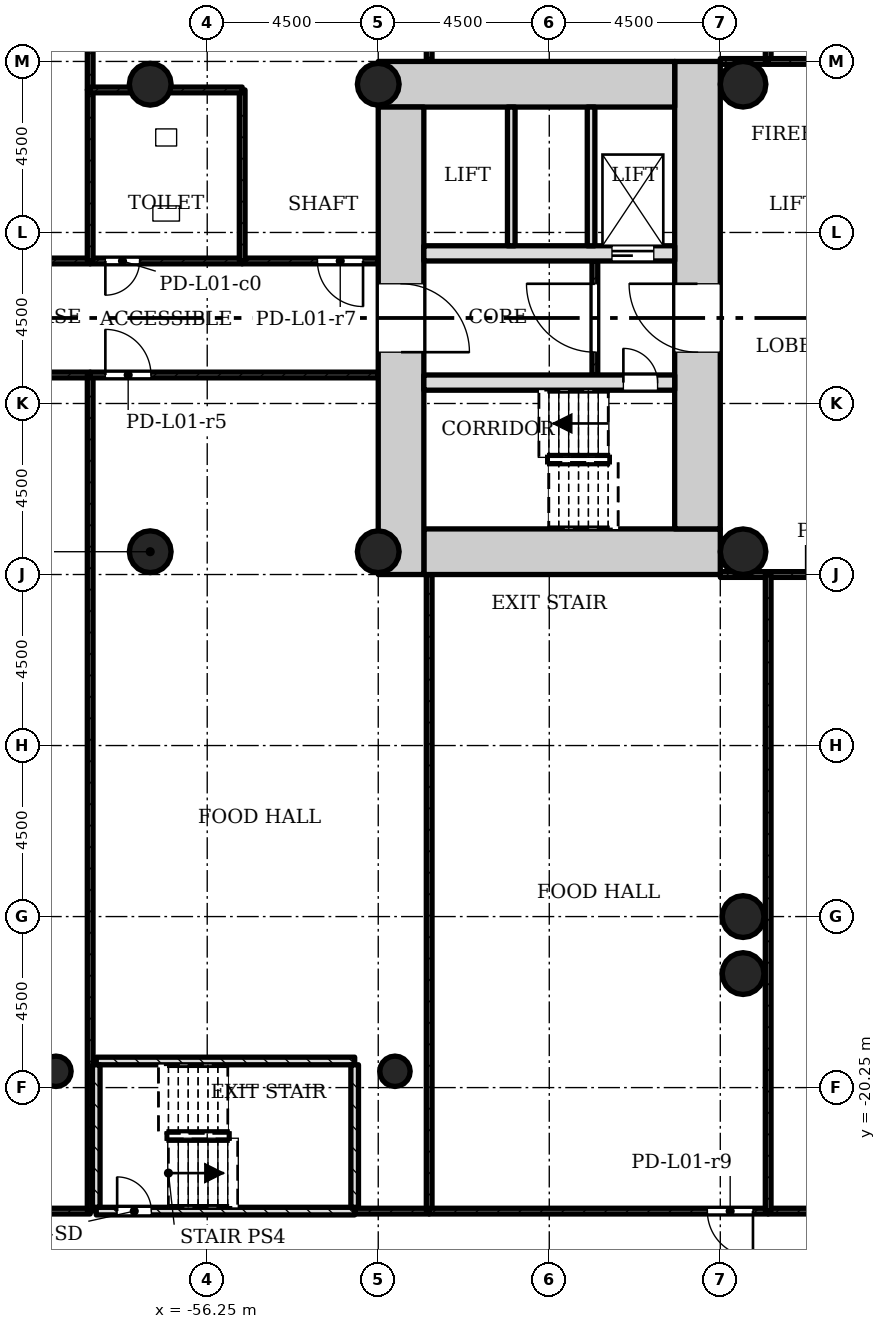
"""IFC4 building model, lengths in metres.
Left out: names, types, materials, properties, quantities, classifications, styles, units other than length and angle.
Written with IfcOpenShell. Run it as: python <this file> out.ifc"""

import sys

from ifc_helpers import new_model, si_unit, direction, frame, frame_2d, origin, origin_2d, place, context, subcontext, project, spatial, rectangle, hollow_circle, extrude, element, fill, save


model = new_model("IFC4")
c1 = context("Model", 3, precision=1e-05, world=origin(), true_north=direction((0.0, 1.0)))
c2 = subcontext(c1, "Body", "Model", "MODEL_VIEW")
j1 = project(units=[si_unit("LENGTHUNIT", "METRE"), si_unit("PLANEANGLEUNIT", "RADIAN")], contexts=[c1])
p1 = place(None, origin())
s1 = spatial("IfcSite", under=j1, at=p1, CompositionType="ELEMENT")
p2 = place(p1, origin())
s2 = spatial("IfcBuilding", under=s1, at=p2, CompositionType="ELEMENT")
p3 = place(p2, frame((0.0, 0.0, 6.0)))
s3 = spatial("IfcBuildingStorey", under=s2, at=p3, CompositionType="ELEMENT", Elevation=6.0)
p4 = place(p3, frame((-50.55, -6.15, 0.0), z_axis=(0.0, 0.0, 1.0), x_axis=(1.0, 0.0, 0.0)))
e1 = element("IfcWall", 1, at=p4, inside=s3, PredefinedType="SHEAR", context=c2, shape_type="SweptSolid", body=[
    extrude(rectangle(XDim=7.8, YDim=1.2, at=frame_2d((3.9, 0.0))), origin(), (0.0, 0.0, 1.0), 5.0),
])
p5 = place(p3, frame((-43.35, -5.55, 0.0), z_axis=(0.0, 0.0, 1.0), x_axis=(0.0, 1.0, 0.0)))
e2 = element("IfcWall", 2, at=p5, inside=s3, PredefinedType="SHEAR", context=c2, shape_type="SweptSolid", body=[
    extrude(rectangle(XDim=12.3, YDim=1.2, at=frame_2d((6.15, 0.0))), origin(), (0.0, 0.0, 1.0), 5.0),
])
p6 = place(p5, frame((4.65, 0.0, 0.0)))
e3 = element("IfcOpeningElement", 3, at=p6, cuts=e2, PredefinedType="OPENING", context=c2, shape_type="SweptSolid", body=[
    extrude(rectangle(XDim=1.8, YDim=2.1, at=frame_2d((0.9, 1.05))), frame((0.0, 0.61, 0.0), z_axis=(0.0, -1.0, 0.0), x_axis=(1.0, 0.0, 0.0)), (0.0, 0.0, 1.0), 1.22),
])
p7 = place(p3, frame((-43.95, 6.15, 0.0), z_axis=(0.0, 0.0, 1.0), x_axis=(-1.0, 0.0, 0.0)))
e4 = element("IfcWall", 4, at=p7, inside=s3, PredefinedType="SHEAR", context=c2, shape_type="SweptSolid", body=[
    extrude(rectangle(XDim=7.8, YDim=1.2, at=frame_2d((3.9, 0.0))), origin(), (0.0, 0.0, 1.0), 5.0),
])
p8 = place(p3, frame((-51.15, 5.55, 0.0), z_axis=(0.0, 0.0, 1.0), x_axis=(0.0, -1.0, 0.0)))
e5 = element("IfcWall", 5, at=p8, inside=s3, PredefinedType="SHEAR", context=c2, shape_type="SweptSolid", body=[
    extrude(rectangle(XDim=12.3, YDim=1.2, at=frame_2d((6.15, 0.0))), origin(), (0.0, 0.0, 1.0), 5.0),
])
p9 = place(p8, frame((4.65, 0.0, 0.0)))
e6 = element("IfcOpeningElement", 6, at=p9, cuts=e5, PredefinedType="OPENING", context=c2, shape_type="SweptSolid", body=[
    extrude(rectangle(XDim=1.8, YDim=2.1, at=frame_2d((0.9, 1.05))), frame((0.0, 0.61, 0.0), z_axis=(0.0, -1.0, 0.0), x_axis=(1.0, 0.0, 0.0)), (0.0, 0.0, 1.0), 1.22),
])
p10 = place(p3, frame((-50.55, -1.7, 0.0), z_axis=(0.0, 0.0, 1.0), x_axis=(1.0, 0.0, 0.0)))
e7 = element("IfcWall", 7, at=p10, inside=s3, PredefinedType="SHEAR", context=c2, shape_type="SweptSolid", body=[
    extrude(rectangle(XDim=6.6, YDim=0.4, at=frame_2d((3.3, 0.0))), origin(), (0.0, 0.0, 1.0), 5.0),
])
p11 = place(p10, frame((5.25, 0.0, 0.0)))
e8 = element("IfcOpeningElement", 8, at=p11, cuts=e7, PredefinedType="OPENING", context=c2, shape_type="SweptSolid", body=[
    extrude(rectangle(XDim=0.9, YDim=2.1, at=frame_2d((0.45, 1.05))), frame((0.0, 0.21, 0.0), z_axis=(0.0, -1.0, 0.0), x_axis=(1.0, 0.0, 0.0)), (0.0, 0.0, 1.0), 0.42),
])
p12 = place(p3, frame((-50.55, 1.7, 0.0), z_axis=(0.0, 0.0, 1.0), x_axis=(1.0, 0.0, 0.0)))
e9 = element("IfcWall", 9, at=p12, inside=s3, PredefinedType="SHEAR", context=c2, shape_type="SweptSolid", body=[
    extrude(rectangle(XDim=6.6, YDim=0.4, at=frame_2d((3.3, 0.0))), origin(), (0.0, 0.0, 1.0), 5.0),
])
p13 = place(p12, frame((4.95, 0.0, 0.0)))
e10 = element("IfcOpeningElement", 10, at=p13, cuts=e9, PredefinedType="OPENING", context=c2, shape_type="SweptSolid", body=[
    extrude(rectangle(XDim=1.1, YDim=2.1, at=frame_2d((0.55, 1.05))), frame((0.0, 0.21, 0.0), z_axis=(0.0, -1.0, 0.0), x_axis=(1.0, 0.0, 0.0)), (0.0, 0.0, 1.0), 0.42),
])
for number, where, z_axis, x_axis in (
    (11, (-51.75, -6.15, 0.0), (0.0, 0.0, 1.0), (1.0, 0.0, 0.0)),
    (12, (-51.75, 6.15, 0.0), (0.0, 0.0, 1.0), (1.0, 0.0, 0.0)),
    (13, (-57.75, -6.15, 0.0), (0.0, 0.0, 1.0), (1.0, 0.0, 0.0)),
    (14, (-57.75, 6.15, 0.0), (0.0, 0.0, 1.0), (1.0, 0.0, 0.0)),
    (15, (-42.15, -15.75, 0.0), (0.0, 0.0, 1.0), (1.0, 0.0, 0.0)),
    (16, (-42.15, -17.25, 0.0), (0.0, 0.0, 1.0), (1.0, 0.0, 0.0)),
):
    element("IfcColumn", number, at=place(p3, frame(where, z_axis=z_axis, x_axis=x_axis)), inside=s3, PredefinedType="COLUMN", context=c2, shape_type="SweptSolid", body=[
        extrude(hollow_circle(Radius=0.55, WallThickness=0.04, at=origin_2d()), origin(), (0.0, 0.0, 1.0), 5.0),
    ])
for number, where, z_axis, x_axis in (
    (17, (-42.15, -6.15, 0.0), (0.0, 0.0, 1.0), (1.0, 0.0, 0.0)),
    (18, (-42.15, 6.15, 0.0), (0.0, 0.0, 1.0), (1.0, 0.0, 0.0)),
):
    element("IfcColumn", number, at=place(p3, frame(where, z_axis=z_axis, x_axis=x_axis)), inside=s3, PredefinedType="COLUMN", context=c2, shape_type="SweptSolid", body=[
        extrude(hollow_circle(Radius=0.6, WallThickness=0.045, at=origin_2d()), origin(), (0.0, 0.0, 1.0), 5.0),
    ])
for number, where, z_axis, x_axis in (
    (19, (-60.23, -19.821, 0.0), (0.0, 0.0, 1.0), (1.0, 0.0, 0.0)),
    (20, (-51.31, -19.821, 0.0), (0.0, 0.0, 1.0), (1.0, 0.0, 0.0)),
):
    element("IfcColumn", number, at=place(p3, frame(where, z_axis=z_axis, x_axis=x_axis)), inside=s3, PredefinedType="COLUMN", context=c2, shape_type="SweptSolid", body=[
        extrude(hollow_circle(Radius=0.4, WallThickness=0.028, at=origin_2d()), origin(), (0.0, 0.0, 1.0), 5.0),
    ])
p14 = place(p3, frame((-46.05, 1.5, 0.0), z_axis=(0.0, 0.0, 1.0), x_axis=(0.0, -1.0, 0.0)))
e21 = element("IfcWall", 21, at=p14, inside=s3, PredefinedType="PARTITIONING", context=c2, shape_type="SweptSolid", body=[
    extrude(rectangle(XDim=3.0, YDim=0.15, at=frame_2d((1.5, 0.0))), origin(), (0.0, 0.0, 1.0), 4.58),
])
p15 = place(p14, frame((0.6, 0.0, 0.0)))
e22 = element("IfcOpeningElement", 22, at=p15, cuts=e21, PredefinedType="OPENING", context=c2, shape_type="SweptSolid", body=[
    extrude(rectangle(XDim=1.8, YDim=2.1, at=frame_2d((0.9, 1.05))), frame((0.0, 0.085, 0.0), z_axis=(0.0, -1.0, 0.0), x_axis=(1.0, 0.0, 0.0)), (0.0, 0.0, 1.0), 0.17),
])
for number, where, z_axis, x_axis in (
    (23, (-46.15, 5.55, 0.0), (0.0, 0.0, 1.0), (0.0, -1.0, 0.0)),
    (24, (-48.25, 5.55, 0.0), (0.0, 0.0, 1.0), (0.0, -1.0, 0.0)),
):
    element("IfcWall", number, at=place(p3, frame(where, z_axis=z_axis, x_axis=x_axis)), inside=s3, PredefinedType="SOLIDWALL", context=c2, shape_type="SweptSolid", body=[
        extrude(rectangle(XDim=3.65, YDim=0.2, at=frame_2d((1.825, 0.0))), origin(), (0.0, 0.0, 1.0), 4.58),
    ])
p16 = place(p3, frame((-69.85, -1.5, 0.0), z_axis=(0.0, 0.0, 1.0), x_axis=(1.0, 0.0, 0.0)))
e25 = element("IfcWall", 25, at=p16, inside=s3, PredefinedType="PARTITIONING", context=c2, shape_type="SweptSolid", body=[
    extrude(rectangle(XDim=10.52, YDim=0.15, at=frame_2d((5.26, 0.0))), origin(), (0.0, 0.0, 1.0), 4.58),
])
p17 = place(p16, frame((2.4, 0.0, 0.0)))
e26 = element("IfcOpeningElement", 26, at=p17, cuts=e25, PredefinedType="OPENING", context=c2, shape_type="SweptSolid", body=[
    extrude(rectangle(XDim=1.2, YDim=2.1, at=frame_2d((0.6, 1.05))), frame((0.0, 0.085, 0.0), z_axis=(0.0, -1.0, 0.0), x_axis=(1.0, 0.0, 0.0)), (0.0, 0.0, 1.0), 0.17),
])
p18 = place(p3, frame((-59.33, -23.5, 0.0), z_axis=(0.0, 0.0, 1.0), x_axis=(-1.0, 0.0, 0.0)))
e27 = element("IfcWall", 27, at=p18, inside=s3, PredefinedType="PARTITIONING", context=c2, shape_type="SweptSolid", body=[
    extrude(rectangle(XDim=10.52, YDim=0.15, at=frame_2d((5.26, 0.0))), origin(), (0.0, 0.0, 1.0), 4.58),
])
p19 = place(p3, frame((-59.33, -1.5, 0.0), z_axis=(0.0, 0.0, 1.0), x_axis=(0.0, -1.0, 0.0)))
e28 = element("IfcWall", 28, at=p19, inside=s3, PredefinedType="PARTITIONING", context=c2, shape_type="SweptSolid", body=[
    extrude(rectangle(XDim=22.0, YDim=0.15, at=frame_2d((11.0, 0.0))), origin(), (0.0, 0.0, 1.0), 4.58),
])
p20 = place(p3, frame((-59.33, 1.5, 0.0), z_axis=(0.0, 0.0, 1.0), x_axis=(-1.0, 0.0, 0.0)))
e29 = element("IfcWall", 29, at=p20, inside=s3, PredefinedType="PARTITIONING", context=c2, shape_type="SweptSolid", body=[
    extrude(rectangle(XDim=1.96, YDim=0.15, at=frame_2d((0.98, 0.0))), origin(), (0.0, 0.0, 1.0), 4.58),
])
p21 = place(p3, frame((-59.33, 26.5, 0.0), z_axis=(0.0, 0.0, 1.0), x_axis=(0.0, -1.0, 0.0)))
e30 = element("IfcWall", 30, at=p21, inside=s3, PredefinedType="PARTITIONING", context=c2, shape_type="SweptSolid", body=[
    extrude(rectangle(XDim=20.5, YDim=0.15, at=frame_2d((10.25, 0.0))), origin(), (0.0, 0.0, 1.0), 4.58),
])
p22 = place(p3, frame((-59.33, -1.5, 0.0), z_axis=(0.0, 0.0, 1.0), x_axis=(1.0, 0.0, 0.0)))
e31 = element("IfcWall", 31, at=p22, inside=s3, PredefinedType="PARTITIONING", context=c2, shape_type="SweptSolid", body=[
    extrude(rectangle(XDim=7.58, YDim=0.15, at=frame_2d((3.79, 0.0))), origin(), (0.0, 0.0, 1.0), 4.58),
])
p23 = place(p22, frame((0.4, 0.0, 0.0)))
e32 = element("IfcOpeningElement", 32, at=p23, cuts=e31, PredefinedType="OPENING", context=c2, shape_type="SweptSolid", body=[
    extrude(rectangle(XDim=1.2, YDim=2.1, at=frame_2d((0.6, 1.05))), frame((0.0, 0.085, 0.0), z_axis=(0.0, -1.0, 0.0), x_axis=(1.0, 0.0, 0.0)), (0.0, 0.0, 1.0), 0.17),
])
p24 = place(p3, frame((-50.41, -23.5, 0.0), z_axis=(0.0, 0.0, 1.0), x_axis=(-1.0, 0.0, 0.0)))
e33 = element("IfcWall", 33, at=p24, inside=s3, PredefinedType="PARTITIONING", context=c2, shape_type="SweptSolid", body=[
    extrude(rectangle(XDim=1.96, YDim=0.15, at=frame_2d((0.98, 0.0))), origin(), (0.0, 0.0, 1.0), 4.58),
])
p25 = place(p3, frame((-50.41, -6.75, 0.0), z_axis=(0.0, 0.0, 1.0), x_axis=(0.0, -1.0, 0.0)))
e34 = element("IfcWall", 34, at=p25, inside=s3, PredefinedType="PARTITIONING", context=c2, shape_type="SweptSolid", body=[
    extrude(rectangle(XDim=16.75, YDim=0.15, at=frame_2d((8.375, 0.0))), origin(), (0.0, 0.0, 1.0), 4.58),
])
p26 = place(p3, frame((-51.75, 1.5, 0.0), z_axis=(0.0, 0.0, 1.0), x_axis=(-1.0, 0.0, 0.0)))
e35 = element("IfcWall", 35, at=p26, inside=s3, PredefinedType="PARTITIONING", context=c2, shape_type="SweptSolid", body=[
    extrude(rectangle(XDim=3.58, YDim=0.15, at=frame_2d((1.79, 0.0))), origin(), (0.0, 0.0, 1.0), 4.58),
])
p27 = place(p26, frame((0.4, 0.0, 0.0)))
e36 = element("IfcOpeningElement", 36, at=p27, cuts=e35, PredefinedType="OPENING", context=c2, shape_type="SweptSolid", body=[
    extrude(rectangle(XDim=1.2, YDim=2.1, at=frame_2d((0.6, 1.05))), frame((0.0, 0.085, 0.0), z_axis=(0.0, -1.0, 0.0), x_axis=(1.0, 0.0, 0.0)), (0.0, 0.0, 1.0), 0.17),
])
p28 = place(p3, frame((-42.75, -6.75, 0.0), z_axis=(0.0, 0.0, 1.0), x_axis=(1.0, 0.0, 0.0)))
e37 = element("IfcWall", 37, at=p28, inside=s3, PredefinedType="PARTITIONING", context=c2, shape_type="SweptSolid", body=[
    extrude(rectangle(XDim=1.26, YDim=0.15, at=frame_2d((0.63, 0.0))), origin(), (0.0, 0.0, 1.0), 4.58),
])
p29 = place(p3, frame((-41.49, -23.5, 0.0), z_axis=(0.0, 0.0, 1.0), x_axis=(-1.0, 0.0, 0.0)))
e38 = element("IfcWall", 38, at=p29, inside=s3, PredefinedType="PARTITIONING", context=c2, shape_type="SweptSolid", body=[
    extrude(rectangle(XDim=8.92, YDim=0.15, at=frame_2d((4.46, 0.0))), origin(), (0.0, 0.0, 1.0), 4.58),
])
p30 = place(p29, frame((0.4, 0.0, 0.0)))
e39 = element("IfcOpeningElement", 39, at=p30, cuts=e38, PredefinedType="OPENING", context=c2, shape_type="SweptSolid", body=[
    extrude(rectangle(XDim=1.2, YDim=2.1, at=frame_2d((0.6, 1.05))), frame((0.0, 0.085, 0.0), z_axis=(0.0, -1.0, 0.0), x_axis=(1.0, 0.0, 0.0)), (0.0, 0.0, 1.0), 0.17),
])
p31 = place(p3, frame((-41.49, 6.75, 0.0), z_axis=(0.0, 0.0, 1.0), x_axis=(-1.0, 0.0, 0.0)))
e40 = element("IfcWall", 40, at=p31, inside=s3, PredefinedType="PARTITIONING", context=c2, shape_type="SweptSolid", body=[
    extrude(rectangle(XDim=1.26, YDim=0.15, at=frame_2d((0.63, 0.0))), origin(), (0.0, 0.0, 1.0), 4.58),
])
for number, where, z_axis, x_axis in (
    (41, (-50.41, 6.75, 0.0), (0.0, 0.0, 1.0), (0.0, 1.0, 0.0)),
    (42, (-41.49, 26.5, 0.0), (0.0, 0.0, 1.0), (0.0, -1.0, 0.0)),
):
    element("IfcWall", number, at=place(p3, frame(where, z_axis=z_axis, x_axis=x_axis)), inside=s3, PredefinedType="PARTITIONING", context=c2, shape_type="SweptSolid", body=[
        extrude(rectangle(XDim=19.75, YDim=0.15, at=frame_2d((9.875, 0.0))), origin(), (0.0, 0.0, 1.0), 4.58),
    ])
p32 = place(p3, frame((-41.49, -6.75, 0.0), z_axis=(0.0, 0.0, 1.0), x_axis=(1.0, 0.0, 0.0)))
e43 = element("IfcWall", 43, at=p32, inside=s3, PredefinedType="PARTITIONING", context=c2, shape_type="SweptSolid", body=[
    extrude(rectangle(XDim=8.92, YDim=0.15, at=frame_2d((4.46, 0.0))), origin(), (0.0, 0.0, 1.0), 4.58),
])
p33 = place(p32, frame((1.0, 0.0, 0.0)))
e44 = element("IfcOpeningElement", 44, at=p33, cuts=e43, PredefinedType="OPENING", context=c2, shape_type="SweptSolid", body=[
    extrude(rectangle(XDim=1.2, YDim=2.1, at=frame_2d((0.6, 1.05))), frame((0.0, 0.085, 0.0), z_axis=(0.0, -1.0, 0.0), x_axis=(1.0, 0.0, 0.0)), (0.0, 0.0, 1.0), 0.17),
])
p34 = place(p3, frame((-32.57, -23.5, 0.0), z_axis=(0.0, 0.0, 1.0), x_axis=(-1.0, 0.0, 0.0)))
e45 = element("IfcWall", 45, at=p34, inside=s3, PredefinedType="PARTITIONING", context=c2, shape_type="SweptSolid", body=[
    extrude(rectangle(XDim=8.92, YDim=0.15, at=frame_2d((4.46, 0.0))), origin(), (0.0, 0.0, 1.0), 4.58),
])
p35 = place(p3, frame((-41.49, -23.5, 0.0), z_axis=(0.0, 0.0, 1.0), x_axis=(0.0, 1.0, 0.0)))
e46 = element("IfcWall", 46, at=p35, inside=s3, PredefinedType="PARTITIONING", context=c2, shape_type="SweptSolid", body=[
    extrude(rectangle(XDim=16.75, YDim=0.15, at=frame_2d((8.375, 0.0))), origin(), (0.0, 0.0, 1.0), 4.58),
])
p36 = place(p3, frame((-32.57, 6.75, 0.0), z_axis=(0.0, 0.0, 1.0), x_axis=(-1.0, 0.0, 0.0)))
e47 = element("IfcWall", 47, at=p36, inside=s3, PredefinedType="PARTITIONING", context=c2, shape_type="SweptSolid", body=[
    extrude(rectangle(XDim=8.92, YDim=0.15, at=frame_2d((4.46, 0.0))), origin(), (0.0, 0.0, 1.0), 4.58),
])
p37 = place(p3, frame((-59.33, 1.5, 0.0), z_axis=(0.0, 0.0, 1.0), x_axis=(1.0, 0.0, 0.0)))
e48 = element("IfcWall", 48, at=p37, inside=s3, PredefinedType="PARTITIONING", context=c2, shape_type="SweptSolid", body=[
    extrude(rectangle(XDim=4.0, YDim=0.15, at=frame_2d((2.0, 0.0))), origin(), (0.0, 0.0, 1.0), 4.58),
])
p38 = place(p37, frame((0.4, 0.0, 0.0)))
e49 = element("IfcOpeningElement", 49, at=p38, cuts=e48, PredefinedType="OPENING", context=c2, shape_type="SweptSolid", body=[
    extrude(rectangle(XDim=0.9, YDim=2.1, at=frame_2d((0.45, 1.05))), frame((0.0, 0.085, 0.0), z_axis=(0.0, -1.0, 0.0), x_axis=(1.0, 0.0, 0.0)), (0.0, 0.0, 1.0), 0.17),
])
for number, where, z_axis, x_axis in (
    (50, (-59.33, 6.0, 0.0), (0.0, 0.0, 1.0), (0.0, -1.0, 0.0)),
    (51, (-55.33, 1.5, 0.0), (0.0, 0.0, 1.0), (0.0, 1.0, 0.0)),
):
    element("IfcWall", number, at=place(p3, frame(where, z_axis=z_axis, x_axis=x_axis)), inside=s3, PredefinedType="PARTITIONING", context=c2, shape_type="SweptSolid", body=[
        extrude(rectangle(XDim=4.5, YDim=0.15, at=frame_2d((2.25, 0.0))), origin(), (0.0, 0.0, 1.0), 4.58),
    ])
p39 = place(p3, frame((-55.33, 6.0, 0.0), z_axis=(0.0, 0.0, 1.0), x_axis=(-1.0, 0.0, 0.0)))
e52 = element("IfcWall", 52, at=p39, inside=s3, PredefinedType="PARTITIONING", context=c2, shape_type="SweptSolid", body=[
    extrude(rectangle(XDim=4.0, YDim=0.15, at=frame_2d((2.0, 0.0))), origin(), (0.0, 0.0, 1.0), 4.58),
])
p40 = place(p3, frame((-59.17, -23.5, 0.0), z_axis=(0.0, 0.0, 1.0), x_axis=(1.0, 0.0, 0.0)))
e53 = element("IfcWall", 53, at=p40, inside=s3, PredefinedType="SHEAR", context=c2, shape_type="SweptSolid", body=[
    extrude(rectangle(XDim=6.8, YDim=0.2, at=frame_2d((3.4, 0.0))), origin(), (0.0, 0.0, 1.0), 4.58),
])
p41 = place(p40, frame((0.55, 0.0, 0.0)))
e54 = element("IfcOpeningElement", 54, at=p41, cuts=e53, PredefinedType="OPENING", context=c2, shape_type="SweptSolid", body=[
    extrude(rectangle(XDim=0.9, YDim=2.1, at=frame_2d((0.45, 1.05))), frame((0.0, 0.11, 0.0), z_axis=(0.0, -1.0, 0.0), x_axis=(1.0, 0.0, 0.0)), (0.0, 0.0, 1.0), 0.22),
])
p42 = place(p3, frame((-59.17, -19.55, 0.0), z_axis=(0.0, 0.0, 1.0), x_axis=(1.0, 0.0, 0.0)))
e55 = element("IfcWall", 55, at=p42, inside=s3, PredefinedType="SHEAR", context=c2, shape_type="SweptSolid", body=[
    extrude(rectangle(XDim=6.8, YDim=0.2, at=frame_2d((3.4, 0.0))), origin(), (0.0, 0.0, 1.0), 4.58),
])
for number, where, z_axis, x_axis in (
    (56, (-59.17, -23.4, 0.0), (0.0, 0.0, 1.0), (0.0, 1.0, 0.0)),
    (57, (-52.37, -23.4, 0.0), (0.0, 0.0, 1.0), (0.0, 1.0, 0.0)),
):
    element("IfcWall", number, at=place(p3, frame(where, z_axis=z_axis, x_axis=x_axis)), inside=s3, PredefinedType="SHEAR", context=c2, shape_type="SweptSolid", body=[
        extrude(rectangle(XDim=3.75, YDim=0.2, at=frame_2d((1.875, 0.0))), origin(), (0.0, 0.0, 1.0), 4.58),
    ])
p43 = place(p15, origin())
e58 = element("IfcDoor", 58, at=p43, inside=s3, OperationType="SINGLE_SWING_LEFT", PredefinedType="DOOR", context=c2, shape_type="SweptSolid", body=[
    extrude(rectangle(XDim=1.8, YDim=2.1, at=frame_2d((0.9, 1.05))), frame((0.0, 0.025, 0.0), z_axis=(0.0, -1.0, 0.0), x_axis=(1.0, 0.0, 0.0)), (0.0, 0.0, 1.0), 0.05),
])
fill(e22, e58)
p44 = place(p23, origin())
e59 = element("IfcDoor", 59, at=p44, inside=s3, OperationType="SINGLE_SWING_RIGHT", PredefinedType="DOOR", context=c2, shape_type="SweptSolid", body=[
    extrude(rectangle(XDim=1.2, YDim=2.1, at=frame_2d((0.6, 1.05))), frame((0.0, 0.025, 0.0), z_axis=(0.0, -1.0, 0.0), x_axis=(1.0, 0.0, 0.0)), (0.0, 0.0, 1.0), 0.05),
])
fill(e32, e59)
p45 = place(p27, origin())
e60 = element("IfcDoor", 60, at=p45, inside=s3, OperationType="SINGLE_SWING_RIGHT", PredefinedType="DOOR", context=c2, shape_type="SweptSolid", body=[
    extrude(rectangle(XDim=1.2, YDim=2.1, at=frame_2d((0.6, 1.05))), frame((0.0, 0.025, 0.0), z_axis=(0.0, -1.0, 0.0), x_axis=(1.0, 0.0, 0.0)), (0.0, 0.0, 1.0), 0.05),
])
fill(e36, e60)
p46 = place(p30, origin())
e61 = element("IfcDoor", 61, at=p46, inside=s3, OperationType="SINGLE_SWING_RIGHT", PredefinedType="DOOR", context=c2, shape_type="SweptSolid", body=[
    extrude(rectangle(XDim=1.2, YDim=2.1, at=frame_2d((0.6, 1.05))), frame((0.0, 0.025, 0.0), z_axis=(0.0, -1.0, 0.0), x_axis=(1.0, 0.0, 0.0)), (0.0, 0.0, 1.0), 0.05),
])
fill(e39, e61)
p47 = place(p38, origin())
e62 = element("IfcDoor", 62, at=p47, inside=s3, OperationType="SINGLE_SWING_LEFT", PredefinedType="DOOR", context=c2, shape_type="SweptSolid", body=[
    extrude(rectangle(XDim=0.9, YDim=2.1, at=frame_2d((0.45, 1.05))), frame((0.0, 0.025, 0.0), z_axis=(0.0, -1.0, 0.0), x_axis=(1.0, 0.0, 0.0)), (0.0, 0.0, 1.0), 0.05),
])
fill(e49, e62)
p48 = place(p41, origin())
e63 = element("IfcDoor", 63, at=p48, inside=s3, OperationType="SINGLE_SWING_RIGHT", PredefinedType="DOOR", context=c2, shape_type="SweptSolid", body=[
    extrude(rectangle(XDim=0.9, YDim=2.1, at=frame_2d((0.45, 1.05))), frame((0.0, 0.025, 0.0), z_axis=(0.0, -1.0, 0.0), x_axis=(1.0, 0.0, 0.0)), (0.0, 0.0, 1.0), 0.05),
])
fill(e54, e63)
p49 = place(p11, origin())
e64 = element("IfcDoor", 64, at=p49, inside=s3, OperationType="SINGLE_SWING_RIGHT", PredefinedType="DOOR", context=c2, shape_type="SweptSolid", body=[
    extrude(rectangle(XDim=0.9, YDim=2.1, at=frame_2d((0.45, 1.05))), frame((0.0, 0.025, 0.0), z_axis=(0.0, -1.0, 0.0), x_axis=(1.0, 0.0, 0.0)), (0.0, 0.0, 1.0), 0.05),
])
fill(e8, e64)
p50 = place(p13, origin())
e65 = element("IfcDoor", 65, at=p50, inside=s3, OperationType="SLIDING_TO_LEFT", PredefinedType="DOOR", context=c2, shape_type="SweptSolid", body=[
    extrude(rectangle(XDim=1.1, YDim=2.1, at=frame_2d((0.55, 1.05))), frame((0.0, 0.025, 0.0), z_axis=(0.0, -1.0, 0.0), x_axis=(1.0, 0.0, 0.0)), (0.0, 0.0, 1.0), 0.05),
])
fill(e10, e65)
p51 = place(p6, origin())
e66 = element("IfcDoor", 66, at=p51, inside=s3, OperationType="SINGLE_SWING_LEFT", PredefinedType="DOOR", context=c2, shape_type="SweptSolid", body=[
    extrude(rectangle(XDim=1.8, YDim=2.1, at=frame_2d((0.9, 1.05))), frame((0.0, 0.025, 0.0), z_axis=(0.0, -1.0, 0.0), x_axis=(1.0, 0.0, 0.0)), (0.0, 0.0, 1.0), 0.05),
])
fill(e3, e66)
p52 = place(p9, origin())
e67 = element("IfcDoor", 67, at=p52, inside=s3, OperationType="SINGLE_SWING_LEFT", PredefinedType="DOOR", context=c2, shape_type="SweptSolid", body=[
    extrude(rectangle(XDim=1.8, YDim=2.1, at=frame_2d((0.9, 1.05))), frame((0.0, 0.025, 0.0), z_axis=(0.0, -1.0, 0.0), x_axis=(1.0, 0.0, 0.0)), (0.0, 0.0, 1.0), 0.05),
])
fill(e6, e67)
save(model, sys.argv[1])
